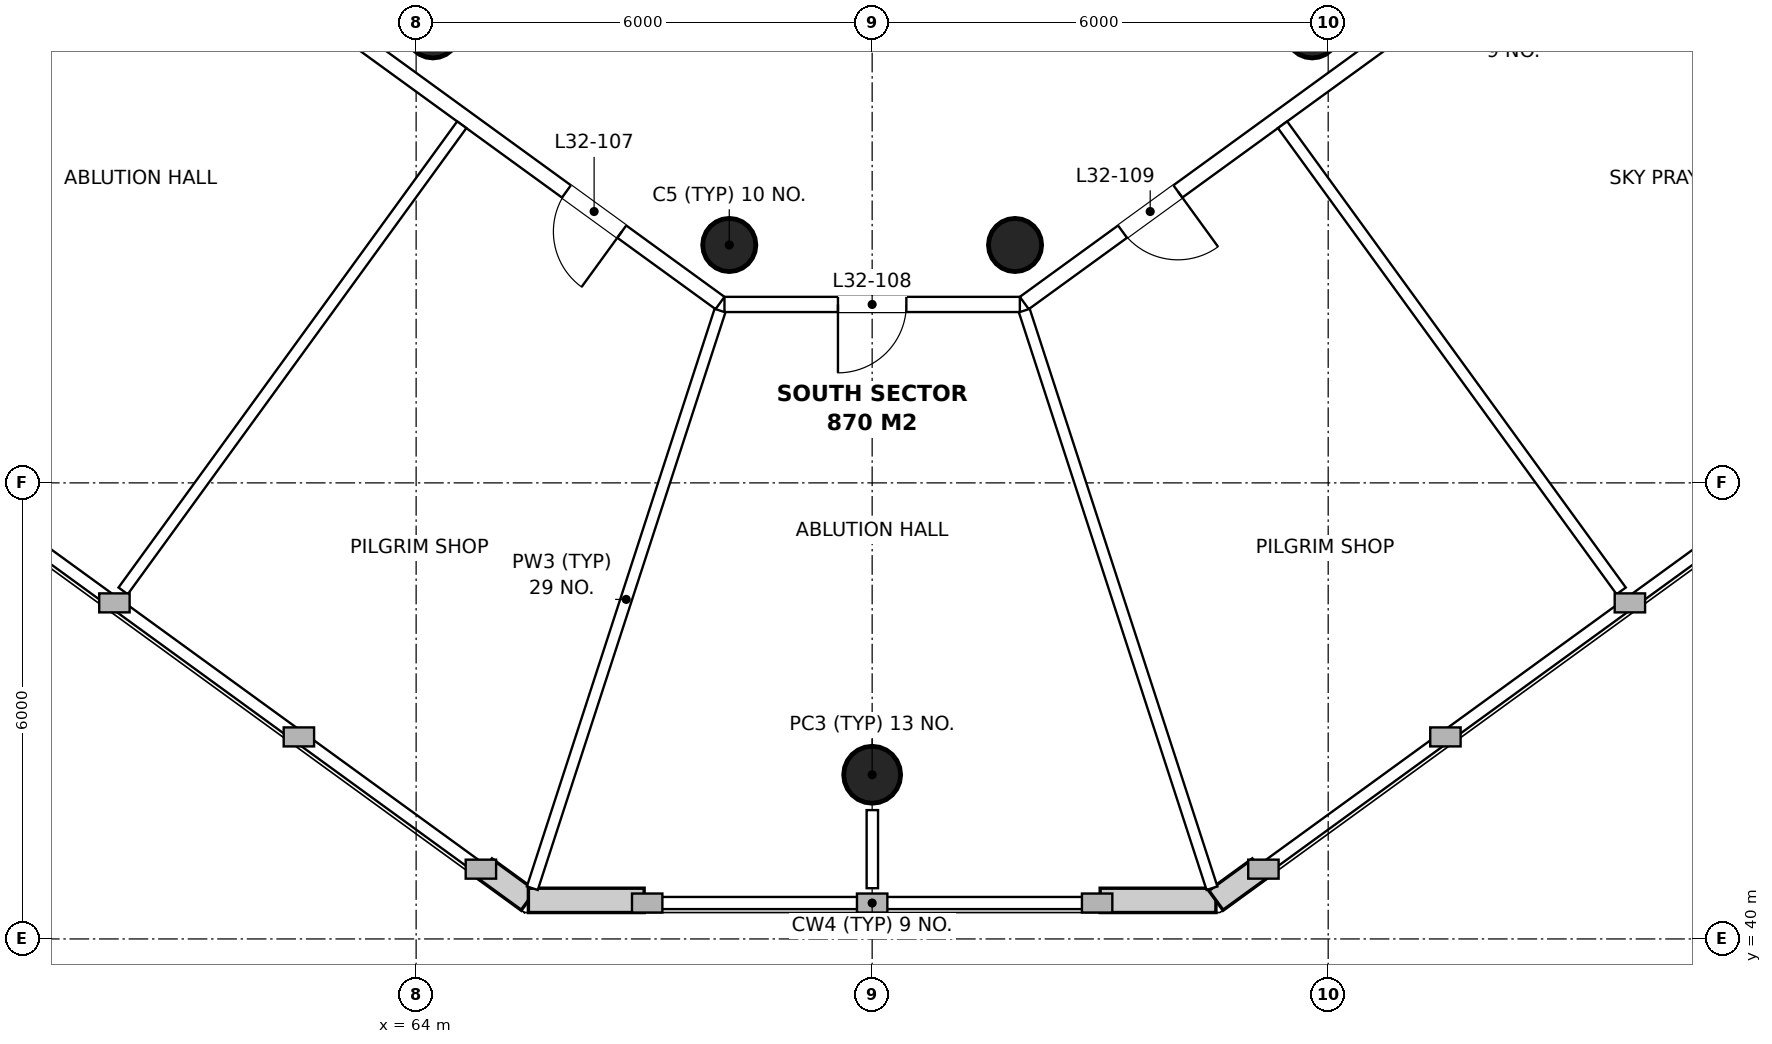
"""IFC4 building model, lengths in metres.
Left out: names, types, materials, properties, quantities, classifications, styles, units other than length and angle.
Written with IfcOpenShell. Run it as: python <this file> out.ifc"""

import sys

from ifc_helpers import new_model, si_unit, direction, frame, frame_2d, origin, origin_2d, place, context, subcontext, project, spatial, rectangle, circle, extrude, element, fill, save


model = new_model("IFC4")
c1 = context("Model", 3, precision=1e-05, world=origin(), true_north=direction((0.0, 1.0)))
c2 = subcontext(c1, "Body", "Model", "MODEL_VIEW")
j1 = project(units=[si_unit("LENGTHUNIT", "METRE"), si_unit("PLANEANGLEUNIT", "RADIAN")], contexts=[c1])
p1 = place(None, origin())
s1 = spatial("IfcSite", under=j1, at=p1, CompositionType="ELEMENT")
p2 = place(p1, origin())
s2 = spatial("IfcBuilding", under=s1, at=p2, CompositionType="ELEMENT")
p3 = place(p2, frame((0.0, 0.0, 142.6)))
s3 = spatial("IfcBuildingStorey", under=s2, at=p3, CompositionType="ELEMENT", Elevation=142.6)
p4 = place(p3, frame((70.0, 42.16, 0.0), z_axis=(0.0, 0.0, 1.0), x_axis=(1.0, 0.0, 0.0)))
e1 = element("IfcColumn", 1, at=p4, inside=s3, PredefinedType="COLUMN", context=c2, shape_type="SweptSolid", body=[
    extrude(circle(Radius=0.375, at=origin_2d()), origin(), (0.0, 0.0, 1.0), 6.0),
])
for number, where, z_axis, x_axis in (
    (2, (64.22, 51.94, 0.0), (0.0, 0.0, 1.0), (1.0, 0.0, 0.0)),
    (3, (68.12, 49.13, 0.0), (0.0, 0.0, 1.0), (1.0, 0.0, 0.0)),
    (4, (71.88, 49.13, 0.0), (0.0, 0.0, 1.0), (1.0, 0.0, 0.0)),
    (5, (75.79, 51.94, 0.0), (0.0, 0.0, 1.0), (1.0, 0.0, 0.0)),
):
    element("IfcColumn", number, at=place(p3, frame(where, z_axis=z_axis, x_axis=x_axis)), inside=s3, PredefinedType="COLUMN", context=c2, shape_type="SweptSolid", body=[
        extrude(circle(Radius=0.35, at=origin_2d()), origin(), (0.0, 0.0, 1.0), 6.0),
    ])
p5 = place(p3, frame((64.905, 40.923, 0.0), z_axis=(0.0, 0.0, 1.0), x_axis=(0.809064470568, -0.587719901369, 0.0)))
e6 = element("IfcWall", 6, at=p5, inside=s3, PredefinedType="SOLIDWALL", context=c2, shape_type="SweptSolid", body=[
    extrude(rectangle(XDim=0.707, YDim=0.32, at=frame_2d((0.354, 0.0))), origin(), (0.0, 0.0, 1.0), 5.7),
])
for number, where, z_axis, x_axis in (
    (7, (65.477, 40.508, 0.0), (0.0, 0.0, 1.0), (1.0, 0.0, 0.0)),
    (8, (73.0, 40.508, 0.0), (0.0, 0.0, 1.0), (1.0, 0.0, 0.0)),
):
    element("IfcWall", number, at=place(p3, frame(where, z_axis=z_axis, x_axis=x_axis)), inside=s3, PredefinedType="SOLIDWALL", context=c2, shape_type="SweptSolid", body=[
        extrude(rectangle(XDim=1.523, YDim=0.32, at=frame_2d((0.761, 0.0))), origin(), (0.0, 0.0, 1.0), 5.7),
    ])
p6 = place(p3, frame((74.523, 40.508, 0.0), z_axis=(0.0, 0.0, 1.0), x_axis=(0.809064470568, 0.587719901369, 0.0)))
e9 = element("IfcWall", 9, at=p6, inside=s3, PredefinedType="SOLIDWALL", context=c2, shape_type="SweptSolid", body=[
    extrude(rectangle(XDim=0.707, YDim=0.32, at=frame_2d((0.354, 0.0))), origin(), (0.0, 0.0, 1.0), 5.7),
])
p7 = place(p3, frame((84.875, 57.719, 0.0), z_axis=(0.0, 0.0, 1.0), x_axis=(-0.80902196565, -0.587778409858, 0.0)))
e10 = element("IfcWall", 10, at=p7, inside=s3, PredefinedType="PARTITIONING", context=c2, shape_type="SweptSolid", body=[
    extrude(rectangle(XDim=15.911, YDim=0.2, at=frame_2d((7.956, 0.0))), origin(), (0.0, 0.0, 1.0), 5.25),
])
p8 = place(p7, frame((13.414, 0.0, 0.0)))
e11 = element("IfcOpeningElement", 11, at=p8, cuts=e10, PredefinedType="OPENING", context=c2, shape_type="SweptSolid", body=[
    extrude(rectangle(XDim=0.9, YDim=2.1, at=frame_2d((0.45, 1.05))), frame((0.0, 0.11, 0.0), z_axis=(0.0, -1.0, 0.0), x_axis=(1.0, 0.0, 0.0)), (0.0, 0.0, 1.0), 0.22),
])
p9 = place(p7, frame((6.649, 0.0, 0.0)))
e12 = element("IfcOpeningElement", 12, at=p9, cuts=e10, PredefinedType="OPENING", context=c2, shape_type="SweptSolid", body=[
    extrude(rectangle(XDim=0.9, YDim=2.1, at=frame_2d((0.45, 1.05))), frame((0.0, 0.11, 0.0), z_axis=(0.0, -1.0, 0.0), x_axis=(1.0, 0.0, 0.0)), (0.0, 0.0, 1.0), 0.22),
])
p10 = place(p3, frame((71.943, 48.347, 0.0), z_axis=(0.0, 0.0, 1.0), x_axis=(-1.0, 0.0, 0.0)))
e13 = element("IfcWall", 13, at=p10, inside=s3, PredefinedType="PARTITIONING", context=c2, shape_type="SweptSolid", body=[
    extrude(rectangle(XDim=3.886, YDim=0.2, at=frame_2d((1.943, 0.0))), origin(), (0.0, 0.0, 1.0), 5.7),
])
p11 = place(p10, frame((1.493, 0.0, 0.0)))
e14 = element("IfcOpeningElement", 14, at=p11, cuts=e13, PredefinedType="OPENING", context=c2, shape_type="SweptSolid", body=[
    extrude(rectangle(XDim=0.9, YDim=2.1, at=frame_2d((0.45, 1.05))), frame((0.0, 0.11, 0.0), z_axis=(0.0, -1.0, 0.0), x_axis=(1.0, 0.0, 0.0)), (0.0, 0.0, 1.0), 0.22),
])
p12 = place(p3, frame((67.998, 48.367, 0.0), z_axis=(0.0, 0.0, 1.0), x_axis=(-0.80902196565, 0.587778409858, 0.0)))
e15 = element("IfcWall", 15, at=p12, inside=s3, PredefinedType="PARTITIONING", context=c2, shape_type="SweptSolid", body=[
    extrude(rectangle(XDim=15.911, YDim=0.2, at=frame_2d((7.956, 0.0))), origin(), (0.0, 0.0, 1.0), 5.0),
])
p13 = place(p12, frame((12.723, 0.0, 0.0)))
e16 = element("IfcOpeningElement", 16, at=p13, cuts=e15, PredefinedType="OPENING", context=c2, shape_type="SweptSolid", body=[
    extrude(rectangle(XDim=0.9, YDim=2.1, at=frame_2d((0.45, 1.05))), frame((0.0, 0.11, 0.0), z_axis=(0.0, -1.0, 0.0), x_axis=(1.0, 0.0, 0.0)), (0.0, 0.0, 1.0), 0.22),
])
p14 = place(p12, frame((6.677, 0.0, 0.0)))
e17 = element("IfcOpeningElement", 17, at=p14, cuts=e15, PredefinedType="OPENING", context=c2, shape_type="SweptSolid", body=[
    extrude(rectangle(XDim=0.9, YDim=2.1, at=frame_2d((0.45, 1.05))), frame((0.0, 0.11, 0.0), z_axis=(0.0, -1.0, 0.0), x_axis=(1.0, 0.0, 0.0)), (0.0, 0.0, 1.0), 0.22),
])
p15 = place(p12, frame((1.597, 0.0, 0.0)))
e18 = element("IfcOpeningElement", 18, at=p15, cuts=e15, PredefinedType="OPENING", context=c2, shape_type="SweptSolid", body=[
    extrude(rectangle(XDim=0.9, YDim=2.1, at=frame_2d((0.45, 1.05))), frame((0.0, 0.11, 0.0), z_axis=(0.0, -1.0, 0.0), x_axis=(1.0, 0.0, 0.0)), (0.0, 0.0, 1.0), 0.22),
])
for number, where, z_axis, x_axis in (
    (19, (65.529, 40.667, 0.0), (0.0, 0.0, 1.0), (0.309, 0.951, 0.0)),
    (20, (74.471, 40.667, 0.0), (0.0, 0.0, 1.0), (-0.309, 0.951, 0.0)),
):
    element("IfcWall", number, at=place(p3, frame(where, z_axis=z_axis, x_axis=x_axis)), inside=s3, PredefinedType="PARTITIONING", context=c2, shape_type="SweptSolid", body=[
        extrude(rectangle(XDim=7.99, YDim=0.15, at=frame_2d((3.995, 0.0))), origin(), (0.0, 0.0, 1.0), 5.7),
    ])
p16 = place(p3, frame((55.291, 48.106, 0.0), z_axis=(0.0, 0.0, 1.0), x_axis=(0.587779028788, 0.809021515979, 0.0)))
e21 = element("IfcWall", 21, at=p16, inside=s3, PredefinedType="PARTITIONING", context=c2, shape_type="SweptSolid", body=[
    extrude(rectangle(XDim=7.58, YDim=0.15, at=frame_2d((3.79, 0.0))), origin(), (0.0, 0.0, 1.0), 5.0),
])
for number, where, z_axis, x_axis in (
    (22, (60.145, 44.579, 0.0), (0.0, 0.0, 1.0), (0.588, 0.809, 0.0)),
    (23, (79.855, 44.579, 0.0), (0.0, 0.0, 1.0), (-0.588, 0.809, 0.0)),
):
    element("IfcWall", number, at=place(p3, frame(where, z_axis=z_axis, x_axis=x_axis)), inside=s3, PredefinedType="PARTITIONING", context=c2, shape_type="SweptSolid", body=[
        extrude(rectangle(XDim=7.58, YDim=0.15, at=frame_2d((3.79, 0.0))), origin(), (0.0, 0.0, 1.0), 5.7),
    ])
p17 = place(p3, frame((70.002, 41.695, 0.0), z_axis=(0.0, 0.0, 1.0), x_axis=(0.0, -1.0, 0.0)))
e24 = element("IfcWall", 24, at=p17, inside=s3, PredefinedType="PARTITIONING", context=c2, shape_type="SweptSolid", body=[
    extrude(rectangle(XDim=1.028, YDim=0.15, at=frame_2d((0.514, 0.0))), origin(), (0.0, 0.0, 1.0), 5.7),
])
p18 = place(p15, origin())
e25 = element("IfcDoor", 25, at=p18, inside=s3, OperationType="SINGLE_SWING_LEFT", PredefinedType="DOOR", context=c2, shape_type="SweptSolid", body=[
    extrude(rectangle(XDim=0.9, YDim=2.1, at=frame_2d((0.45, 1.05))), frame((0.0, 0.025, 0.0), z_axis=(0.0, -1.0, 0.0), x_axis=(1.0, 0.0, 0.0)), (0.0, 0.0, 1.0), 0.05),
])
fill(e18, e25)
p19 = place(p11, origin())
e26 = element("IfcDoor", 26, at=p19, inside=s3, OperationType="SINGLE_SWING_RIGHT", PredefinedType="DOOR", context=c2, shape_type="SweptSolid", body=[
    extrude(rectangle(XDim=0.9, YDim=2.1, at=frame_2d((0.45, 1.05))), frame((0.0, 0.025, 0.0), z_axis=(0.0, -1.0, 0.0), x_axis=(1.0, 0.0, 0.0)), (0.0, 0.0, 1.0), 0.05),
])
fill(e14, e26)
p20 = place(p8, origin())
e27 = element("IfcDoor", 27, at=p20, inside=s3, OperationType="SINGLE_SWING_LEFT", PredefinedType="DOOR", context=c2, shape_type="SweptSolid", body=[
    extrude(rectangle(XDim=0.9, YDim=2.1, at=frame_2d((0.45, 1.05))), frame((0.0, 0.025, 0.0), z_axis=(0.0, -1.0, 0.0), x_axis=(1.0, 0.0, 0.0)), (0.0, 0.0, 1.0), 0.05),
])
fill(e11, e27)
save(model, sys.argv[1])
